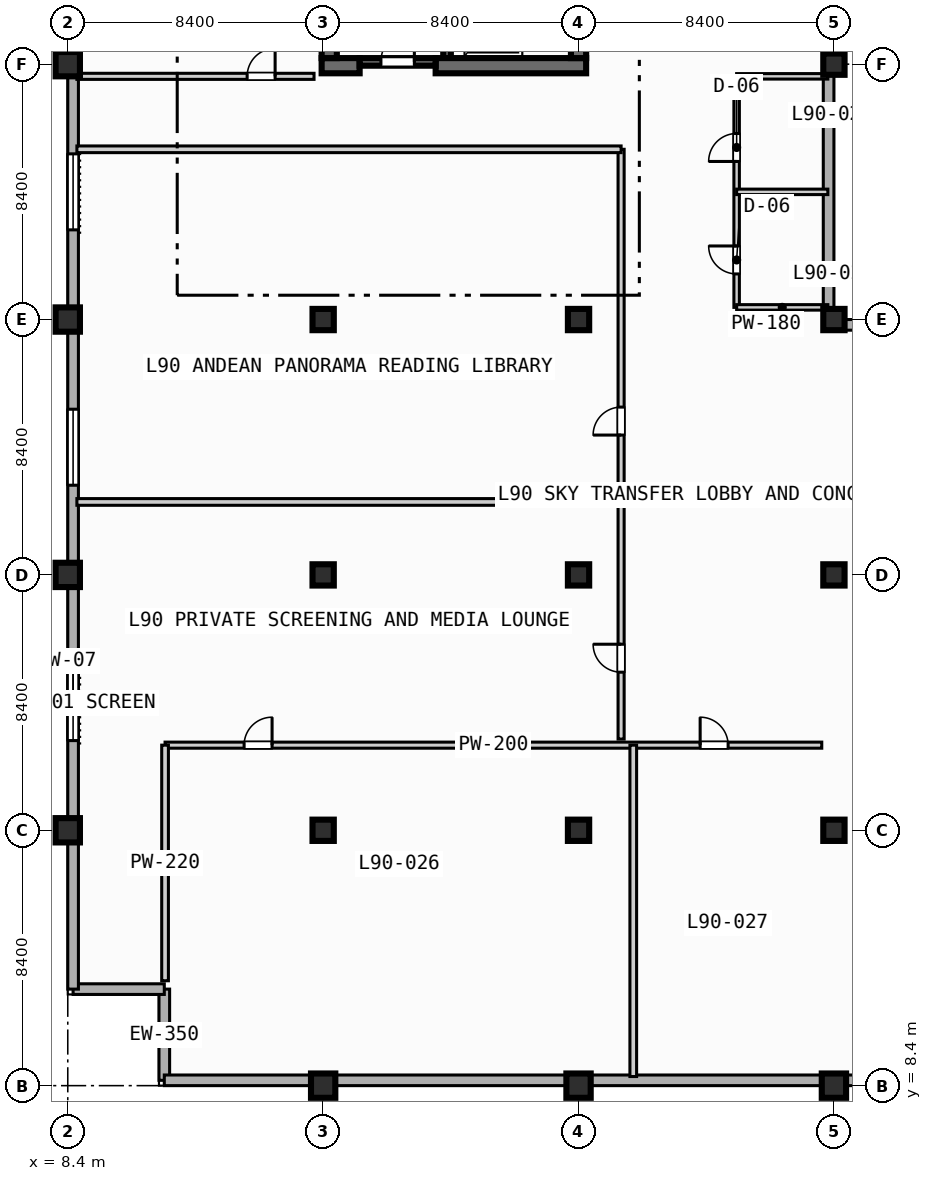
"""IFC4 building model, lengths in metres.
Left out: names, types, materials, properties, quantities, classifications, styles, units other than length and angle.
Written with IfcOpenShell. Run it as: python <this file> out.ifc"""

import sys

from ifc_helpers import new_model, si_unit, direction, frame, frame_2d, origin, origin_2d, place, context, subcontext, project, spatial, rectangle, extrude, element, fill, save


model = new_model("IFC4")
c1 = context("Model", 3, precision=1e-05, world=origin(), true_north=direction((0.0, 1.0)))
c2 = subcontext(c1, "Body", "Model", "MODEL_VIEW")
j1 = project(units=[si_unit("LENGTHUNIT", "METRE"), si_unit("PLANEANGLEUNIT", "RADIAN")], contexts=[c1])
p1 = place(None, origin())
s1 = spatial("IfcSite", under=j1, at=p1, CompositionType="ELEMENT")
p2 = place(p1, origin())
s2 = spatial("IfcBuilding", under=s1, at=p2, CompositionType="ELEMENT")
p3 = place(p2, frame((0.0, 0.0, 363.8)))
s3 = spatial("IfcBuildingStorey", under=s2, at=p3, CompositionType="ELEMENT", Elevation=363.8)
p4 = place(p3, frame((20.875, 42.2, 0.0), z_axis=(0.0, 0.0, 1.0), x_axis=(0.0, 1.0, 0.0)))
e1 = element("IfcWall", 1, at=p4, inside=s3, PredefinedType="SOLIDWALL", context=c2, shape_type="SweptSolid", body=[
    extrude(rectangle(XDim=8.05, YDim=0.25, at=frame_2d((4.025, 0.0))), origin(), (0.0, 0.0, 1.0), 4.45),
])
p5 = place(p3, frame((16.75, 41.95, 0.0), z_axis=(0.0, 0.0, 1.0), x_axis=(1.0, 0.0, 0.0)))
e2 = element("IfcWall", 2, at=p5, inside=s3, PredefinedType="SHEAR", context=c2, shape_type="SweptSolid", body=[
    extrude(rectangle(XDim=1.25, YDim=0.5, at=frame_2d((0.625, 0.0))), origin(), (0.0, 0.0, 1.0), 4.45),
])
p6 = place(p3, frame((20.5, 41.95, 0.0), z_axis=(0.0, 0.0, 1.0), x_axis=(1.0, 0.0, 0.0)))
e3 = element("IfcWall", 3, at=p6, inside=s3, PredefinedType="SHEAR", context=c2, shape_type="SweptSolid", body=[
    extrude(rectangle(XDim=4.95, YDim=0.5, at=frame_2d((2.475, 0.0))), origin(), (0.0, 0.0, 1.0), 4.45),
])
p7 = place(p3, frame((17.0, 42.2, 0.0), z_axis=(0.0, 0.0, 1.0), x_axis=(0.0, 1.0, 0.0)))
e4 = element("IfcWall", 4, at=p7, inside=s3, PredefinedType="SHEAR", context=c2, shape_type="SweptSolid", body=[
    extrude(rectangle(XDim=16.35, YDim=0.5, at=frame_2d((8.175, 0.0))), origin(), (0.0, 0.0, 1.0), 4.45),
])
p8 = place(p3, frame((25.2, 42.2, 0.0), z_axis=(0.0, 0.0, 1.0), x_axis=(0.0, 1.0, 0.0)))
e5 = element("IfcWall", 5, at=p8, inside=s3, PredefinedType="SHEAR", context=c2, shape_type="SweptSolid", body=[
    extrude(rectangle(XDim=8.6, YDim=0.5, at=frame_2d((4.3, 0.0))), origin(), (0.0, 0.0, 1.0), 4.45),
])
for number, where, z_axis, x_axis in (
    (6, (8.4, 16.8, 0.0), (0.0, 0.0, 1.0), (1.0, 0.0, 0.0)),
    (7, (8.4, 25.2, 0.0), (0.0, 0.0, 1.0), (1.0, 0.0, 0.0)),
    (8, (8.4, 33.6, 0.0), (0.0, 0.0, 1.0), (1.0, 0.0, 0.0)),
    (9, (8.4, 42.0, 0.0), (0.0, 0.0, 1.0), (1.0, 0.0, 0.0)),
    (10, (16.8, 8.4, 0.0), (0.0, 0.0, 1.0), (1.0, 0.0, 0.0)),
):
    element("IfcColumn", number, at=place(p3, frame(where, z_axis=z_axis, x_axis=x_axis)), inside=s3, PredefinedType="COLUMN", context=c2, shape_type="SweptSolid", body=[
        extrude(rectangle(XDim=0.8, YDim=0.8, at=origin_2d()), origin(), (0.0, 0.0, 1.0), 4.8),
    ])
for number, where, z_axis, x_axis in (
    (11, (16.8, 16.8, 0.0), (0.0, 0.0, 1.0), (1.0, 0.0, 0.0)),
    (12, (16.8, 25.2, 0.0), (0.0, 0.0, 1.0), (1.0, 0.0, 0.0)),
    (13, (16.8, 33.6, 0.0), (0.0, 0.0, 1.0), (1.0, 0.0, 0.0)),
):
    element("IfcColumn", number, at=place(p3, frame(where, z_axis=z_axis, x_axis=x_axis)), inside=s3, PredefinedType="COLUMN", context=c2, shape_type="SweptSolid", body=[
        extrude(rectangle(XDim=0.7, YDim=0.7, at=origin_2d()), origin(), (0.0, 0.0, 1.0), 4.8),
    ])
p9 = place(p3, frame((25.2, 8.4, 0.0), z_axis=(0.0, 0.0, 1.0), x_axis=(1.0, 0.0, 0.0)))
e14 = element("IfcColumn", 14, at=p9, inside=s3, PredefinedType="COLUMN", context=c2, shape_type="SweptSolid", body=[
    extrude(rectangle(XDim=0.8, YDim=0.8, at=origin_2d()), origin(), (0.0, 0.0, 1.0), 4.8),
])
for number, where, z_axis, x_axis in (
    (15, (25.2, 16.8, 0.0), (0.0, 0.0, 1.0), (1.0, 0.0, 0.0)),
    (16, (25.2, 25.2, 0.0), (0.0, 0.0, 1.0), (1.0, 0.0, 0.0)),
    (17, (25.2, 33.6, 0.0), (0.0, 0.0, 1.0), (1.0, 0.0, 0.0)),
):
    element("IfcColumn", number, at=place(p3, frame(where, z_axis=z_axis, x_axis=x_axis)), inside=s3, PredefinedType="COLUMN", context=c2, shape_type="SweptSolid", body=[
        extrude(rectangle(XDim=0.7, YDim=0.7, at=origin_2d()), origin(), (0.0, 0.0, 1.0), 4.8),
    ])
p10 = place(p3, frame((33.6, 8.4, 0.0), z_axis=(0.0, 0.0, 1.0), x_axis=(1.0, 0.0, 0.0)))
e18 = element("IfcColumn", 18, at=p10, inside=s3, PredefinedType="COLUMN", context=c2, shape_type="SweptSolid", body=[
    extrude(rectangle(XDim=0.8, YDim=0.8, at=origin_2d()), origin(), (0.0, 0.0, 1.0), 4.8),
])
for number, where, z_axis, x_axis in (
    (19, (33.6, 16.8, 0.0), (0.0, 0.0, 1.0), (1.0, 0.0, 0.0)),
    (20, (33.6, 25.2, 0.0), (0.0, 0.0, 1.0), (1.0, 0.0, 0.0)),
    (21, (33.6, 33.6, 0.0), (0.0, 0.0, 1.0), (1.0, 0.0, 0.0)),
    (22, (33.6, 42.0, 0.0), (0.0, 0.0, 1.0), (1.0, 0.0, 0.0)),
):
    element("IfcColumn", number, at=place(p3, frame(where, z_axis=z_axis, x_axis=x_axis)), inside=s3, PredefinedType="COLUMN", context=c2, shape_type="SweptSolid", body=[
        extrude(rectangle(XDim=0.7, YDim=0.7, at=origin_2d()), origin(), (0.0, 0.0, 1.0), 4.8),
    ])
for number, where, z_axis, x_axis in (
    (23, (11.575, 8.575, 0.0), (0.0, 0.0, 1.0), (0.0, 1.0, 0.0)),
    (24, (11.575, 11.575, 0.0), (0.0, 0.0, 1.0), (-1.0, 0.0, 0.0)),
):
    element("IfcWall", number, at=place(p3, frame(where, z_axis=z_axis, x_axis=x_axis)), inside=s3, PredefinedType="STANDARD", context=c2, shape_type="SweptSolid", body=[
        extrude(rectangle(XDim=3.0, YDim=0.35, at=frame_2d((1.5, 0.0))), origin(), (0.0, 0.0, 1.0), 4.45),
    ])
p11 = place(p3, frame((8.575, 11.575, 0.0), z_axis=(0.0, 0.0, 1.0), x_axis=(0.0, 1.0, 0.0)))
e25 = element("IfcWall", 25, at=p11, inside=s3, PredefinedType="STANDARD", context=c2, shape_type="SweptSolid", body=[
    extrude(rectangle(XDim=60.85, YDim=0.35, at=frame_2d((30.425, 0.0))), origin(), (0.0, 0.0, 1.0), 4.45),
])
p12 = place(p11, frame((8.175, 0.0, 0.85)))
e26 = element("IfcOpeningElement", 26, at=p12, cuts=e25, PredefinedType="OPENING", context=c2, shape_type="SweptSolid", body=[
    extrude(rectangle(XDim=2.5, YDim=2.2, at=frame_2d((1.25, 1.1))), frame((0.0, 0.185, 0.0), z_axis=(0.0, -1.0, 0.0), x_axis=(1.0, 0.0, 0.0)), (0.0, 0.0, 1.0), 0.37),
])
p13 = place(p11, frame((16.575, 0.0, 0.85)))
e27 = element("IfcOpeningElement", 27, at=p13, cuts=e25, PredefinedType="OPENING", context=c2, shape_type="SweptSolid", body=[
    extrude(rectangle(XDim=2.5, YDim=2.2, at=frame_2d((1.25, 1.1))), frame((0.0, 0.185, 0.0), z_axis=(0.0, -1.0, 0.0), x_axis=(1.0, 0.0, 0.0)), (0.0, 0.0, 1.0), 0.37),
])
p14 = place(p11, frame((24.975, 0.0, 0.85)))
e28 = element("IfcOpeningElement", 28, at=p14, cuts=e25, PredefinedType="OPENING", context=c2, shape_type="SweptSolid", body=[
    extrude(rectangle(XDim=2.5, YDim=2.2, at=frame_2d((1.25, 1.1))), frame((0.0, 0.185, 0.0), z_axis=(0.0, -1.0, 0.0), x_axis=(1.0, 0.0, 0.0)), (0.0, 0.0, 1.0), 0.37),
])
p15 = place(p11, frame((33.375, 0.0, 0.85)))
e29 = element("IfcOpeningElement", 29, at=p15, cuts=e25, PredefinedType="OPENING", context=c2, shape_type="SweptSolid", body=[
    extrude(rectangle(XDim=2.5, YDim=2.2, at=frame_2d((1.25, 1.1))), frame((0.0, 0.185, 0.0), z_axis=(0.0, -1.0, 0.0), x_axis=(1.0, 0.0, 0.0)), (0.0, 0.0, 1.0), 0.37),
])
p16 = place(p11, frame((41.775, 0.0, 0.85)))
e30 = element("IfcOpeningElement", 30, at=p16, cuts=e25, PredefinedType="OPENING", context=c2, shape_type="SweptSolid", body=[
    extrude(rectangle(XDim=2.5, YDim=2.2, at=frame_2d((1.25, 1.1))), frame((0.0, 0.185, 0.0), z_axis=(0.0, -1.0, 0.0), x_axis=(1.0, 0.0, 0.0)), (0.0, 0.0, 1.0), 0.37),
])
p17 = place(p3, frame((33.425, 72.425, 0.0), z_axis=(0.0, 0.0, 1.0), x_axis=(0.0, -1.0, 0.0)))
e31 = element("IfcWall", 31, at=p17, inside=s3, PredefinedType="STANDARD", context=c2, shape_type="SweptSolid", body=[
    extrude(rectangle(XDim=39.0, YDim=0.35, at=frame_2d((19.5, 0.0))), origin(), (0.0, 0.0, 1.0), 4.45),
])
p18 = place(p3, frame((33.425, 33.425, 0.0), z_axis=(0.0, 0.0, 1.0), x_axis=(1.0, 0.0, 0.0)))
e32 = element("IfcWall", 32, at=p18, inside=s3, PredefinedType="STANDARD", context=c2, shape_type="SweptSolid", body=[
    extrude(rectangle(XDim=38.2, YDim=0.35, at=frame_2d((19.1, 0.0))), origin(), (0.0, 0.0, 1.0), 3.599),
])
p19 = place(p3, frame((71.625, 8.575, 0.0), z_axis=(0.0, 0.0, 1.0), x_axis=(-1.0, 0.0, 0.0)))
e33 = element("IfcWall", 33, at=p19, inside=s3, PredefinedType="STANDARD", context=c2, shape_type="SweptSolid", body=[
    extrude(rectangle(XDim=60.05, YDim=0.35, at=frame_2d((30.025, 0.0))), origin(), (0.0, 0.0, 1.0), 3.599),
])
p20 = place(p19, frame((24.175, 0.0, 0.85)))
e34 = element("IfcOpeningElement", 34, at=p20, cuts=e33, PredefinedType="OPENING", context=c2, shape_type="SweptSolid", body=[
    extrude(rectangle(XDim=2.5, YDim=2.2, at=frame_2d((1.25, 1.1))), frame((0.0, 0.185, 0.0), z_axis=(0.0, -1.0, 0.0), x_axis=(1.0, 0.0, 0.0)), (0.0, 0.0, 1.0), 0.37),
])
p21 = place(p19, frame((15.775, 0.0, 0.85)))
e35 = element("IfcOpeningElement", 35, at=p21, cuts=e33, PredefinedType="OPENING", context=c2, shape_type="SweptSolid", body=[
    extrude(rectangle(XDim=2.5, YDim=2.2, at=frame_2d((1.25, 1.1))), frame((0.0, 0.185, 0.0), z_axis=(0.0, -1.0, 0.0), x_axis=(1.0, 0.0, 0.0)), (0.0, 0.0, 1.0), 0.37),
])
p22 = place(p3, frame((18.0, 42.075, 0.0), z_axis=(0.0, 0.0, 1.0), x_axis=(1.0, 0.0, 0.0)))
e36 = element("IfcWall", 36, at=p22, inside=s3, PredefinedType="SOLIDWALL", context=c2, shape_type="SweptSolid", body=[
    extrude(rectangle(XDim=2.5, YDim=0.25, at=frame_2d((1.25, 0.0))), origin(), (0.0, 0.0, 1.0), 4.45),
])
p23 = place(p22, frame((0.7, 0.0, 0.0)))
e37 = element("IfcOpeningElement", 37, at=p23, cuts=e36, PredefinedType="OPENING", context=c2, shape_type="SweptSolid", body=[
    extrude(rectangle(XDim=1.1, YDim=2.15, at=frame_2d((0.55, 1.075))), frame((0.0, 0.135, 0.0), z_axis=(0.0, -1.0, 0.0), x_axis=(1.0, 0.0, 0.0)), (0.0, 0.0, 1.0), 0.27),
])
p24 = place(p3, frame((30.4, 34.0, 0.0), z_axis=(0.0, 0.0, 1.0), x_axis=(0.0, 1.0, 0.0)))
e38 = element("IfcWall", 38, at=p24, inside=s3, PredefinedType="PLUMBINGWALL", context=c2, shape_type="SweptSolid", body=[
    extrude(rectangle(XDim=7.6, YDim=0.18, at=frame_2d((3.8, 0.0))), origin(), (0.0, 0.0, 1.0), 4.45),
])
p25 = place(p24, frame((1.1, 0.0, 0.0)))
e39 = element("IfcOpeningElement", 39, at=p25, cuts=e38, PredefinedType="OPENING", context=c2, shape_type="SweptSolid", body=[
    extrude(rectangle(XDim=0.92, YDim=2.1, at=frame_2d((0.46, 1.05))), frame((0.0, 0.1, 0.0), z_axis=(0.0, -1.0, 0.0), x_axis=(1.0, 0.0, 0.0)), (0.0, 0.0, 1.0), 0.2),
])
p26 = place(p24, frame((4.8, 0.0, 0.0)))
e40 = element("IfcOpeningElement", 40, at=p26, cuts=e38, PredefinedType="OPENING", context=c2, shape_type="SweptSolid", body=[
    extrude(rectangle(XDim=0.92, YDim=2.1, at=frame_2d((0.46, 1.05))), frame((0.0, 0.1, 0.0), z_axis=(0.0, -1.0, 0.0), x_axis=(1.0, 0.0, 0.0)), (0.0, 0.0, 1.0), 0.2),
])
for number, where, z_axis, x_axis in (
    (41, (30.4, 34.0, 0.0), (0.0, 0.0, 1.0), (1.0, 0.0, 0.0)),
    (42, (30.4, 37.8, 0.0), (0.0, 0.0, 1.0), (1.0, 0.0, 0.0)),
    (43, (30.4, 41.6, 0.0), (0.0, 0.0, 1.0), (1.0, 0.0, 0.0)),
):
    element("IfcWall", number, at=place(p3, frame(where, z_axis=z_axis, x_axis=x_axis)), inside=s3, PredefinedType="PLUMBINGWALL", context=c2, shape_type="SweptSolid", body=[
        extrude(rectangle(XDim=3.0, YDim=0.18, at=frame_2d((1.5, 0.0))), origin(), (0.0, 0.0, 1.0), 4.45),
    ])
p27 = place(p3, frame((8.7, 41.6, 0.0), z_axis=(0.0, 0.0, 1.0), x_axis=(1.0, 0.0, 0.0)))
e44 = element("IfcWall", 44, at=p27, inside=s3, PredefinedType="PARTITIONING", context=c2, shape_type="SweptSolid", body=[
    extrude(rectangle(XDim=7.8, YDim=0.2, at=frame_2d((3.9, 0.0))), origin(), (0.0, 0.0, 1.0), 4.45),
])
p28 = place(p27, frame((5.6, 0.0, 0.0)))
e45 = element("IfcOpeningElement", 45, at=p28, cuts=e44, PredefinedType="OPENING", context=c2, shape_type="SweptSolid", body=[
    extrude(rectangle(XDim=0.92, YDim=2.1, at=frame_2d((0.46, 1.05))), frame((0.0, 0.11, 0.0), z_axis=(0.0, -1.0, 0.0), x_axis=(1.0, 0.0, 0.0)), (0.0, 0.0, 1.0), 0.22),
])
p29 = place(p3, frame((11.6, 19.6, 0.0), z_axis=(0.0, 0.0, 1.0), x_axis=(1.0, 0.0, 0.0)))
e46 = element("IfcWall", 46, at=p29, inside=s3, PredefinedType="PARTITIONING", context=c2, shape_type="SweptSolid", body=[
    extrude(rectangle(XDim=21.6, YDim=0.2, at=frame_2d((10.8, 0.0))), origin(), (0.0, 0.0, 1.0), 4.45),
])
p30 = place(p29, frame((2.6, 0.0, 0.0)))
e47 = element("IfcOpeningElement", 47, at=p30, cuts=e46, PredefinedType="OPENING", context=c2, shape_type="SweptSolid", body=[
    extrude(rectangle(XDim=0.92, YDim=2.1, at=frame_2d((0.46, 1.05))), frame((0.0, 0.11, 0.0), z_axis=(0.0, -1.0, 0.0), x_axis=(1.0, 0.0, 0.0)), (0.0, 0.0, 1.0), 0.22),
])
p31 = place(p29, frame((17.6, 0.0, 0.0)))
e48 = element("IfcOpeningElement", 48, at=p31, cuts=e46, PredefinedType="OPENING", context=c2, shape_type="SweptSolid", body=[
    extrude(rectangle(XDim=0.92, YDim=2.1, at=frame_2d((0.46, 1.05))), frame((0.0, 0.11, 0.0), z_axis=(0.0, -1.0, 0.0), x_axis=(1.0, 0.0, 0.0)), (0.0, 0.0, 1.0), 0.22),
])
p32 = place(p3, frame((11.6, 11.85, 0.0), z_axis=(0.0, 0.0, 1.0), x_axis=(0.0, 1.0, 0.0)))
e49 = element("IfcWall", 49, at=p32, inside=s3, PredefinedType="PARTITIONING", context=c2, shape_type="SweptSolid", body=[
    extrude(rectangle(XDim=7.75, YDim=0.22, at=frame_2d((3.875, 0.0))), origin(), (0.0, 0.0, 1.0), 4.45),
])
p33 = place(p3, frame((27.0, 8.7, 0.0), z_axis=(0.0, 0.0, 1.0), x_axis=(0.0, 1.0, 0.0)))
e50 = element("IfcWall", 50, at=p33, inside=s3, PredefinedType="PARTITIONING", context=c2, shape_type="SweptSolid", body=[
    extrude(rectangle(XDim=10.9, YDim=0.22, at=frame_2d((5.45, 0.0))), origin(), (0.0, 0.0, 1.0), 4.45),
])
p34 = place(p3, frame((26.6, 19.8, 0.0), z_axis=(0.0, 0.0, 1.0), x_axis=(0.0, 1.0, 0.0)))
e51 = element("IfcWall", 51, at=p34, inside=s3, PredefinedType="PARTITIONING", context=c2, shape_type="SweptSolid", body=[
    extrude(rectangle(XDim=19.4, YDim=0.2, at=frame_2d((9.7, 0.0))), origin(), (0.0, 0.0, 1.0), 4.45),
])
p35 = place(p34, frame((2.2, 0.0, 0.0)))
e52 = element("IfcOpeningElement", 52, at=p35, cuts=e51, PredefinedType="OPENING", context=c2, shape_type="SweptSolid", body=[
    extrude(rectangle(XDim=0.92, YDim=2.1, at=frame_2d((0.46, 1.05))), frame((0.0, 0.11, 0.0), z_axis=(0.0, -1.0, 0.0), x_axis=(1.0, 0.0, 0.0)), (0.0, 0.0, 1.0), 0.22),
])
p36 = place(p34, frame((10.0, 0.0, 0.0)))
e53 = element("IfcOpeningElement", 53, at=p36, cuts=e51, PredefinedType="OPENING", context=c2, shape_type="SweptSolid", body=[
    extrude(rectangle(XDim=0.92, YDim=2.1, at=frame_2d((0.46, 1.05))), frame((0.0, 0.11, 0.0), z_axis=(0.0, -1.0, 0.0), x_axis=(1.0, 0.0, 0.0)), (0.0, 0.0, 1.0), 0.22),
])
for number, where, z_axis, x_axis in (
    (54, (8.7, 27.6, 0.0), (0.0, 0.0, 1.0), (1.0, 0.0, 0.0)),
    (55, (8.7, 39.2, 0.0), (0.0, 0.0, 1.0), (1.0, 0.0, 0.0)),
):
    element("IfcWall", number, at=place(p3, frame(where, z_axis=z_axis, x_axis=x_axis)), inside=s3, PredefinedType="PARTITIONING", context=c2, shape_type="SweptSolid", body=[
        extrude(rectangle(XDim=17.9, YDim=0.22, at=frame_2d((8.95, 0.0))), origin(), (0.0, 0.0, 1.0), 4.45),
    ])
p37 = place(p12, origin())
e56 = element("IfcWindow", 56, at=p37, inside=s3, PartitioningType="SINGLE_PANEL", PredefinedType="WINDOW", context=c2, shape_type="SweptSolid", body=[
    extrude(rectangle(XDim=2.5, YDim=2.2, at=frame_2d((1.25, 1.1))), frame((0.0, 0.03, 0.0), z_axis=(0.0, -1.0, 0.0), x_axis=(1.0, 0.0, 0.0)), (0.0, 0.0, 1.0), 0.06),
])
fill(e26, e56)
p38 = place(p13, origin())
e57 = element("IfcWindow", 57, at=p38, inside=s3, PartitioningType="SINGLE_PANEL", PredefinedType="WINDOW", context=c2, shape_type="SweptSolid", body=[
    extrude(rectangle(XDim=2.5, YDim=2.2, at=frame_2d((1.25, 1.1))), frame((0.0, 0.03, 0.0), z_axis=(0.0, -1.0, 0.0), x_axis=(1.0, 0.0, 0.0)), (0.0, 0.0, 1.0), 0.06),
])
fill(e27, e57)
p39 = place(p14, origin())
e58 = element("IfcWindow", 58, at=p39, inside=s3, PartitioningType="SINGLE_PANEL", PredefinedType="WINDOW", context=c2, shape_type="SweptSolid", body=[
    extrude(rectangle(XDim=2.5, YDim=2.2, at=frame_2d((1.25, 1.1))), frame((0.0, 0.03, 0.0), z_axis=(0.0, -1.0, 0.0), x_axis=(1.0, 0.0, 0.0)), (0.0, 0.0, 1.0), 0.06),
])
fill(e28, e58)
p40 = place(p23, origin())
e59 = element("IfcDoor", 59, at=p40, inside=s3, OperationType="SINGLE_SWING_RIGHT", PredefinedType="DOOR", context=c2, shape_type="SweptSolid", body=[
    extrude(rectangle(XDim=1.1, YDim=2.15, at=frame_2d((0.55, 1.075))), frame((0.0, 0.025, 0.0), z_axis=(0.0, -1.0, 0.0), x_axis=(1.0, 0.0, 0.0)), (0.0, 0.0, 1.0), 0.05),
])
fill(e37, e59)
p41 = place(p25, origin())
e60 = element("IfcDoor", 60, at=p41, inside=s3, OperationType="SINGLE_SWING_RIGHT", PredefinedType="DOOR", context=c2, shape_type="SweptSolid", body=[
    extrude(rectangle(XDim=0.92, YDim=2.1, at=frame_2d((0.46, 1.05))), frame((0.0, 0.025, 0.0), z_axis=(0.0, -1.0, 0.0), x_axis=(1.0, 0.0, 0.0)), (0.0, 0.0, 1.0), 0.05),
])
fill(e39, e60)
p42 = place(p26, origin())
e61 = element("IfcDoor", 61, at=p42, inside=s3, OperationType="SINGLE_SWING_LEFT", PredefinedType="DOOR", context=c2, shape_type="SweptSolid", body=[
    extrude(rectangle(XDim=0.92, YDim=2.1, at=frame_2d((0.46, 1.05))), frame((0.0, 0.025, 0.0), z_axis=(0.0, -1.0, 0.0), x_axis=(1.0, 0.0, 0.0)), (0.0, 0.0, 1.0), 0.05),
])
fill(e40, e61)
p43 = place(p28, origin())
e62 = element("IfcDoor", 62, at=p43, inside=s3, OperationType="SINGLE_SWING_RIGHT", PredefinedType="DOOR", context=c2, shape_type="SweptSolid", body=[
    extrude(rectangle(XDim=0.92, YDim=2.1, at=frame_2d((0.46, 1.05))), frame((0.0, 0.025, 0.0), z_axis=(0.0, -1.0, 0.0), x_axis=(1.0, 0.0, 0.0)), (0.0, 0.0, 1.0), 0.05),
])
fill(e45, e62)
p44 = place(p30, origin())
e63 = element("IfcDoor", 63, at=p44, inside=s3, OperationType="SINGLE_SWING_RIGHT", PredefinedType="DOOR", context=c2, shape_type="SweptSolid", body=[
    extrude(rectangle(XDim=0.92, YDim=2.1, at=frame_2d((0.46, 1.05))), frame((0.0, 0.025, 0.0), z_axis=(0.0, -1.0, 0.0), x_axis=(1.0, 0.0, 0.0)), (0.0, 0.0, 1.0), 0.05),
])
fill(e47, e63)
p45 = place(p31, origin())
e64 = element("IfcDoor", 64, at=p45, inside=s3, OperationType="SINGLE_SWING_LEFT", PredefinedType="DOOR", context=c2, shape_type="SweptSolid", body=[
    extrude(rectangle(XDim=0.92, YDim=2.1, at=frame_2d((0.46, 1.05))), frame((0.0, 0.025, 0.0), z_axis=(0.0, -1.0, 0.0), x_axis=(1.0, 0.0, 0.0)), (0.0, 0.0, 1.0), 0.05),
])
fill(e48, e64)
p46 = place(p35, origin())
e65 = element("IfcDoor", 65, at=p46, inside=s3, OperationType="SINGLE_SWING_RIGHT", PredefinedType="DOOR", context=c2, shape_type="SweptSolid", body=[
    extrude(rectangle(XDim=0.92, YDim=2.1, at=frame_2d((0.46, 1.05))), frame((0.0, 0.025, 0.0), z_axis=(0.0, -1.0, 0.0), x_axis=(1.0, 0.0, 0.0)), (0.0, 0.0, 1.0), 0.05),
])
fill(e52, e65)
p47 = place(p36, origin())
e66 = element("IfcDoor", 66, at=p47, inside=s3, OperationType="SINGLE_SWING_LEFT", PredefinedType="DOOR", context=c2, shape_type="SweptSolid", body=[
    extrude(rectangle(XDim=0.92, YDim=2.1, at=frame_2d((0.46, 1.05))), frame((0.0, 0.025, 0.0), z_axis=(0.0, -1.0, 0.0), x_axis=(1.0, 0.0, 0.0)), (0.0, 0.0, 1.0), 0.05),
])
fill(e53, e66)
save(model, sys.argv[1])
